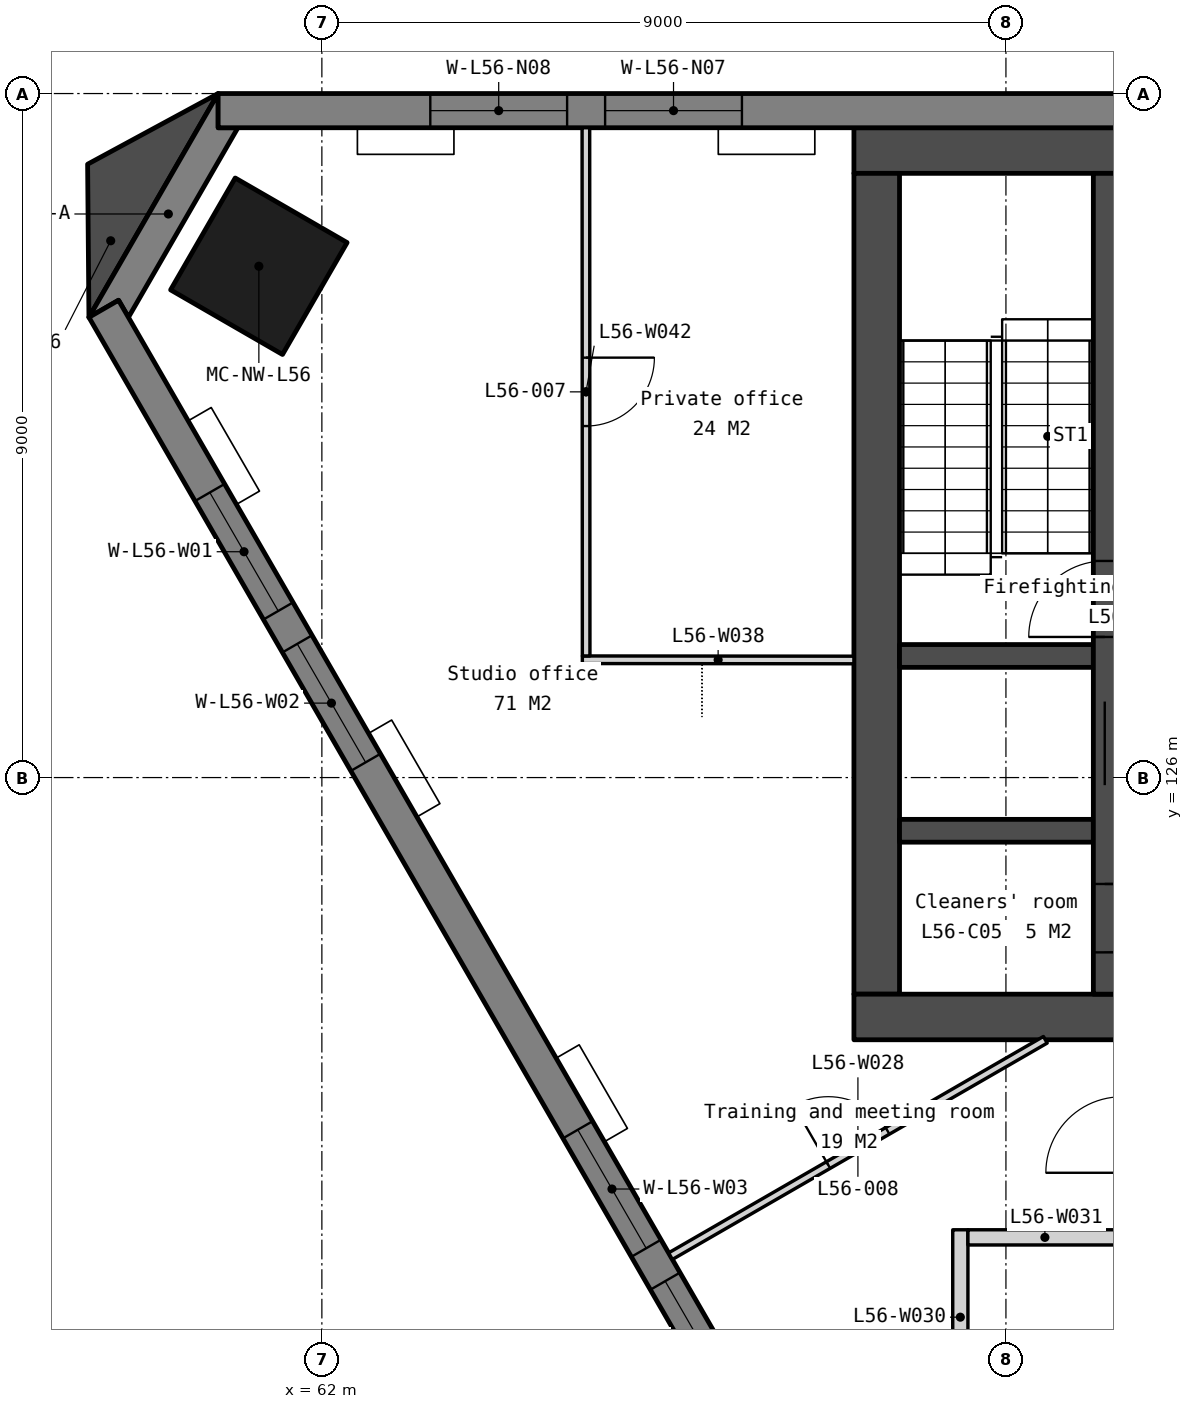
"""IFC4 building model, lengths in metres.
Left out: names, types, materials, properties, quantities, classifications, styles, units other than length and angle.
Written with IfcOpenShell. Run it as: python <this file> out.ifc"""

import sys

from ifc_helpers import new_model, si_unit, direction, frame, frame_2d, origin, origin_2d, place, context, subcontext, project, spatial, polyline, rectangle, outline, extrude, element, fill, save


model = new_model("IFC4")
c1 = context("Model", 3, precision=1e-05, world=origin(), true_north=direction((0.0, 1.0)))
c2 = subcontext(c1, "Body", "Model", "MODEL_VIEW")
j1 = project(units=[si_unit("LENGTHUNIT", "METRE"), si_unit("PLANEANGLEUNIT", "RADIAN")], contexts=[c1])
p1 = place(None, origin())
s1 = spatial("IfcSite", under=j1, at=p1, CompositionType="ELEMENT")
p2 = place(p1, origin())
s2 = spatial("IfcBuilding", under=s1, at=p2, CompositionType="ELEMENT")
p3 = place(p2, frame((0.0, 0.0, 223.1)))
s3 = spatial("IfcBuildingStorey", under=s2, at=p3, CompositionType="ELEMENT", Elevation=223.1)
p4 = place(p3, frame((61.171, 132.728, 0.0), z_axis=(0.0, 0.0, 1.0), x_axis=(-0.5, -0.866025403784, 0.0)))
e1 = element("IfcColumn", 1, at=p4, inside=s3, PredefinedType="COLUMN", context=c2, shape_type="SweptSolid", body=[
    extrude(rectangle(XDim=1.7, YDim=1.7, at=origin_2d()), origin(), (0.0, 0.0, 1.0), 3.9),
])
p5 = place(p3, frame((69.0, 134.25, 0.0), z_axis=(0.0, 0.0, 1.0), x_axis=(1.0, 0.0, 0.0)))
e2 = element("IfcWall", 2, at=p5, inside=s3, PredefinedType="SOLIDWALL", context=c2, shape_type="SweptSolid", body=[
    extrude(rectangle(XDim=22.0, YDim=0.6, at=frame_2d((11.0, 0.0))), origin(), (0.0, 0.0, 1.0), 3.6),
])
p6 = place(p3, frame((69.3, 133.95, 0.0), z_axis=(0.0, 0.0, 1.0), x_axis=(0.0, -1.0, 0.0)))
e3 = element("IfcWall", 3, at=p6, inside=s3, PredefinedType="SOLIDWALL", context=c2, shape_type="SweptSolid", body=[
    extrude(rectangle(XDim=10.8, YDim=0.6, at=frame_2d((5.4, 0.0))), origin(), (0.0, 0.0, 1.0), 3.6),
])
p7 = place(p3, frame((69.0, 122.85, 0.0), z_axis=(0.0, 0.0, 1.0), x_axis=(1.0, 0.0, 0.0)))
e4 = element("IfcWall", 4, at=p7, inside=s3, PredefinedType="SOLIDWALL", context=c2, shape_type="SweptSolid", body=[
    extrude(rectangle(XDim=22.0, YDim=0.6, at=frame_2d((11.0, 0.0))), origin(), (0.0, 0.0, 1.0), 3.6),
])
p8 = place(p7, frame((16.375, 0.0, 0.0)))
e5 = element("IfcOpeningElement", 5, at=p8, cuts=e4, PredefinedType="OPENING", context=c2, shape_type="SweptSolid", body=[
    extrude(rectangle(XDim=1.8, YDim=2.1, at=frame_2d((0.9, 1.05))), frame((0.0, 0.31, 0.0), z_axis=(0.0, -1.0, 0.0), x_axis=(1.0, 0.0, 0.0)), (0.0, 0.0, 1.0), 0.62),
])
p9 = place(p7, frame((3.825, 0.0, 0.0)))
e6 = element("IfcOpeningElement", 6, at=p9, cuts=e4, PredefinedType="OPENING", context=c2, shape_type="SweptSolid", body=[
    extrude(rectangle(XDim=1.8, YDim=2.1, at=frame_2d((0.9, 1.05))), frame((0.0, 0.31, 0.0), z_axis=(0.0, -1.0, 0.0), x_axis=(1.0, 0.0, 0.0)), (0.0, 0.0, 1.0), 0.62),
])
p10 = place(p7, frame((12.85, 0.0, 0.0)))
e7 = element("IfcOpeningElement", 7, at=p10, cuts=e4, PredefinedType="OPENING", context=c2, shape_type="SweptSolid", body=[
    extrude(rectangle(XDim=1.5, YDim=2.1, at=frame_2d((0.75, 1.05))), frame((0.0, 0.31, 0.0), z_axis=(0.0, -1.0, 0.0), x_axis=(1.0, 0.0, 0.0)), (0.0, 0.0, 1.0), 0.62),
])
for number, where, z_axis, x_axis in (
    (8, (69.6, 127.6, 0.0), (0.0, 0.0, 1.0), (1.0, 0.0, 0.0)),
    (9, (69.6, 125.3, 0.0), (0.0, 0.0, 1.0), (1.0, 0.0, 0.0)),
):
    element("IfcWall", number, at=place(p3, frame(where, z_axis=z_axis, x_axis=x_axis)), inside=s3, PredefinedType="SOLIDWALL", context=c2, shape_type="SweptSolid", body=[
        extrude(rectangle(XDim=2.55, YDim=0.3, at=frame_2d((1.275, 0.0))), origin(), (0.0, 0.0, 1.0), 3.6),
    ])
p11 = place(p3, frame((72.3, 133.95, 0.0), z_axis=(0.0, 0.0, 1.0), x_axis=(0.0, -1.0, 0.0)))
e10 = element("IfcWall", 10, at=p11, inside=s3, PredefinedType="SOLIDWALL", context=c2, shape_type="SweptSolid", body=[
    extrude(rectangle(XDim=10.8, YDim=0.3, at=frame_2d((5.4, 0.0))), origin(), (0.0, 0.0, 1.0), 3.6),
])
p12 = place(p11, frame((6.95, 0.0, 0.0)))
e11 = element("IfcOpeningElement", 11, at=p12, cuts=e10, PredefinedType="OPENING", context=c2, shape_type="SweptSolid", body=[
    extrude(rectangle(XDim=1.1, YDim=2.1, at=frame_2d((0.55, 1.05))), frame((0.0, 0.16, 0.0), z_axis=(0.0, -1.0, 0.0), x_axis=(1.0, 0.0, 0.0)), (0.0, 0.0, 1.0), 0.32),
])
p13 = place(p11, frame((9.35, 0.0, 0.0)))
e12 = element("IfcOpeningElement", 12, at=p13, cuts=e10, PredefinedType="OPENING", context=c2, shape_type="SweptSolid", body=[
    extrude(rectangle(XDim=0.9, YDim=2.1, at=frame_2d((0.45, 1.05))), frame((0.0, 0.16, 0.0), z_axis=(0.0, -1.0, 0.0), x_axis=(1.0, 0.0, 0.0)), (0.0, 0.0, 1.0), 0.32),
])
p14 = place(p11, frame((5.1, 0.0, 0.0)))
e13 = element("IfcOpeningElement", 13, at=p14, cuts=e10, PredefinedType="OPENING", context=c2, shape_type="SweptSolid", body=[
    extrude(rectangle(XDim=1.0, YDim=2.1, at=frame_2d((0.5, 1.05))), frame((0.0, 0.16, 0.0), z_axis=(0.0, -1.0, 0.0), x_axis=(1.0, 0.0, 0.0)), (0.0, 0.0, 1.0), 0.32),
])
p15 = place(p3, frame((0.0, 0.0, -0.15)))
e14 = element("IfcWall", 14, at=p15, inside=s3, PredefinedType="SOLIDWALL", context=c2, shape_type="SweptSolid", body=[
    extrude(outline(polyline([(60.635, 135.0), (60.635, 134.55), (60.895, 134.55), (59.455, 132.055), (59.325, 132.281), (58.935, 132.055), (60.635, 135.0)])), origin(), (0.0, 0.0, 1.0), 3.75),
])
p16 = place(p3, frame((99.365, 134.775, -0.15), z_axis=(0.0, 0.0, 1.0), x_axis=(-1.0, 0.0, 0.0)))
e15 = element("IfcWall", 15, at=p16, inside=s3, PredefinedType="SOLIDWALL", context=c2, shape_type="SweptSolid", body=[
    extrude(outline(polyline([(38.729, 0.0), (38.729, 3.75), (0.0, 3.75), (0.0, 0.0), (38.729, 0.0)])), frame((0.0, 0.225, 0.0), z_axis=(0.0, -1.0, 0.0), x_axis=(1.0, 0.0, 0.0)), (0.0, 0.0, 1.0), 0.45),
])
p17 = place(p16, frame((2.791, 0.0, 0.95)))
e16 = element("IfcOpeningElement", 16, at=p17, cuts=e15, PredefinedType="OPENING", context=c2, shape_type="SweptSolid", body=[
    extrude(rectangle(XDim=1.8, YDim=2.2, at=frame_2d((0.9, 1.1))), frame((0.0, 0.235, 0.0), z_axis=(0.0, -1.0, 0.0), x_axis=(1.0, 0.0, 0.0)), (0.0, 0.0, 1.0), 0.47),
])
p18 = place(p16, frame((5.091, 0.0, 0.95)))
e17 = element("IfcOpeningElement", 17, at=p18, cuts=e15, PredefinedType="OPENING", context=c2, shape_type="SweptSolid", body=[
    extrude(rectangle(XDim=1.8, YDim=2.2, at=frame_2d((0.9, 1.1))), frame((0.0, 0.235, 0.0), z_axis=(0.0, -1.0, 0.0), x_axis=(1.0, 0.0, 0.0)), (0.0, 0.0, 1.0), 0.47),
])
p19 = place(p16, frame((12.473, 0.0, 0.95)))
e18 = element("IfcOpeningElement", 18, at=p19, cuts=e15, PredefinedType="OPENING", context=c2, shape_type="SweptSolid", body=[
    extrude(rectangle(XDim=1.8, YDim=2.2, at=frame_2d((0.9, 1.1))), frame((0.0, 0.235, 0.0), z_axis=(0.0, -1.0, 0.0), x_axis=(1.0, 0.0, 0.0)), (0.0, 0.0, 1.0), 0.47),
])
p20 = place(p16, frame((14.773, 0.0, 0.95)))
e19 = element("IfcOpeningElement", 19, at=p20, cuts=e15, PredefinedType="OPENING", context=c2, shape_type="SweptSolid", body=[
    extrude(rectangle(XDim=1.8, YDim=2.2, at=frame_2d((0.9, 1.1))), frame((0.0, 0.235, 0.0), z_axis=(0.0, -1.0, 0.0), x_axis=(1.0, 0.0, 0.0)), (0.0, 0.0, 1.0), 0.47),
])
p21 = place(p16, frame((22.156, 0.0, 0.95)))
e20 = element("IfcOpeningElement", 20, at=p21, cuts=e15, PredefinedType="OPENING", context=c2, shape_type="SweptSolid", body=[
    extrude(rectangle(XDim=1.8, YDim=2.2, at=frame_2d((0.9, 1.1))), frame((0.0, 0.235, 0.0), z_axis=(0.0, -1.0, 0.0), x_axis=(1.0, 0.0, 0.0)), (0.0, 0.0, 1.0), 0.47),
])
p22 = place(p16, frame((24.456, 0.0, 0.95)))
e21 = element("IfcOpeningElement", 21, at=p22, cuts=e15, PredefinedType="OPENING", context=c2, shape_type="SweptSolid", body=[
    extrude(rectangle(XDim=1.8, YDim=2.2, at=frame_2d((0.9, 1.1))), frame((0.0, 0.235, 0.0), z_axis=(0.0, -1.0, 0.0), x_axis=(1.0, 0.0, 0.0)), (0.0, 0.0, 1.0), 0.47),
])
p23 = place(p16, frame((31.838, 0.0, 0.95)))
e22 = element("IfcOpeningElement", 22, at=p23, cuts=e15, PredefinedType="OPENING", context=c2, shape_type="SweptSolid", body=[
    extrude(rectangle(XDim=1.8, YDim=2.2, at=frame_2d((0.9, 1.1))), frame((0.0, 0.235, 0.0), z_axis=(0.0, -1.0, 0.0), x_axis=(1.0, 0.0, 0.0)), (0.0, 0.0, 1.0), 0.47),
])
p24 = place(p16, frame((34.138, 0.0, 0.95)))
e23 = element("IfcOpeningElement", 23, at=p24, cuts=e15, PredefinedType="OPENING", context=c2, shape_type="SweptSolid", body=[
    extrude(rectangle(XDim=1.8, YDim=2.2, at=frame_2d((0.9, 1.1))), frame((0.0, 0.235, 0.0), z_axis=(0.0, -1.0, 0.0), x_axis=(1.0, 0.0, 0.0)), (0.0, 0.0, 1.0), 0.47),
])
p25 = place(p3, frame((59.13, 132.168, -0.15), z_axis=(0.0, 0.0, 1.0), x_axis=(0.500002199942, -0.866024133644, 0.0)))
e24 = element("IfcWall", 24, at=p25, inside=s3, PredefinedType="SOLIDWALL", context=c2, shape_type="SweptSolid", body=[
    extrude(outline(polyline([(38.729, 0.0), (38.729, 3.75), (0.0, 3.75), (0.0, 0.0), (38.729, 0.0)])), frame((0.0, 0.225, 0.0), z_axis=(0.0, -1.0, 0.0), x_axis=(1.0, 0.0, 0.0)), (0.0, 0.0, 1.0), 0.45),
])
p26 = place(p25, frame((2.791, 0.0, 0.95)))
e25 = element("IfcOpeningElement", 25, at=p26, cuts=e24, PredefinedType="OPENING", context=c2, shape_type="SweptSolid", body=[
    extrude(rectangle(XDim=1.8, YDim=2.2, at=frame_2d((0.9, 1.1))), frame((0.0, 0.235, 0.0), z_axis=(0.0, -1.0, 0.0), x_axis=(1.0, 0.0, 0.0)), (0.0, 0.0, 1.0), 0.47),
])
p27 = place(p25, frame((5.091, 0.0, 0.95)))
e26 = element("IfcOpeningElement", 26, at=p27, cuts=e24, PredefinedType="OPENING", context=c2, shape_type="SweptSolid", body=[
    extrude(rectangle(XDim=1.8, YDim=2.2, at=frame_2d((0.9, 1.1))), frame((0.0, 0.235, 0.0), z_axis=(0.0, -1.0, 0.0), x_axis=(1.0, 0.0, 0.0)), (0.0, 0.0, 1.0), 0.47),
])
p28 = place(p25, frame((12.473, 0.0, 0.95)))
e27 = element("IfcOpeningElement", 27, at=p28, cuts=e24, PredefinedType="OPENING", context=c2, shape_type="SweptSolid", body=[
    extrude(rectangle(XDim=1.8, YDim=2.2, at=frame_2d((0.9, 1.1))), frame((0.0, 0.235, 0.0), z_axis=(0.0, -1.0, 0.0), x_axis=(1.0, 0.0, 0.0)), (0.0, 0.0, 1.0), 0.47),
])
p29 = place(p25, frame((14.773, 0.0, 0.95)))
e28 = element("IfcOpeningElement", 28, at=p29, cuts=e24, PredefinedType="OPENING", context=c2, shape_type="SweptSolid", body=[
    extrude(rectangle(XDim=1.8, YDim=2.2, at=frame_2d((0.9, 1.1))), frame((0.0, 0.235, 0.0), z_axis=(0.0, -1.0, 0.0), x_axis=(1.0, 0.0, 0.0)), (0.0, 0.0, 1.0), 0.47),
])
p30 = place(p25, frame((22.156, 0.0, 0.95)))
e29 = element("IfcOpeningElement", 29, at=p30, cuts=e24, PredefinedType="OPENING", context=c2, shape_type="SweptSolid", body=[
    extrude(rectangle(XDim=1.8, YDim=2.2, at=frame_2d((0.9, 1.1))), frame((0.0, 0.235, 0.0), z_axis=(0.0, -1.0, 0.0), x_axis=(1.0, 0.0, 0.0)), (0.0, 0.0, 1.0), 0.47),
])
p31 = place(p25, frame((24.456, 0.0, 0.95)))
e30 = element("IfcOpeningElement", 30, at=p31, cuts=e24, PredefinedType="OPENING", context=c2, shape_type="SweptSolid", body=[
    extrude(rectangle(XDim=1.8, YDim=2.2, at=frame_2d((0.9, 1.1))), frame((0.0, 0.235, 0.0), z_axis=(0.0, -1.0, 0.0), x_axis=(1.0, 0.0, 0.0)), (0.0, 0.0, 1.0), 0.47),
])
p32 = place(p25, frame((31.838, 0.0, 0.95)))
e31 = element("IfcOpeningElement", 31, at=p32, cuts=e24, PredefinedType="OPENING", context=c2, shape_type="SweptSolid", body=[
    extrude(rectangle(XDim=1.8, YDim=2.2, at=frame_2d((0.9, 1.1))), frame((0.0, 0.235, 0.0), z_axis=(0.0, -1.0, 0.0), x_axis=(1.0, 0.0, 0.0)), (0.0, 0.0, 1.0), 0.47),
])
p33 = place(p25, frame((34.138, 0.0, 0.95)))
e32 = element("IfcOpeningElement", 32, at=p33, cuts=e24, PredefinedType="OPENING", context=c2, shape_type="SweptSolid", body=[
    extrude(rectangle(XDim=1.8, YDim=2.2, at=frame_2d((0.9, 1.1))), frame((0.0, 0.235, 0.0), z_axis=(0.0, -1.0, 0.0), x_axis=(1.0, 0.0, 0.0)), (0.0, 0.0, 1.0), 0.47),
])
p34 = place(p3, frame((0.0, 0.0, -0.15)))
e33 = element("IfcWall", 33, at=p34, inside=s3, PredefinedType="SOLIDWALL", context=c2, shape_type="SweptSolid", body=[
    extrude(outline(polyline([(60.635, 135.0), (58.918, 134.07), (58.935, 132.055), (60.635, 135.0)])), origin(), (0.0, 0.0, 1.0), 3.75),
])
p35 = place(p3, frame((66.587, 119.703, 0.0), z_axis=(0.0, 0.0, 1.0), x_axis=(0.866023511746, 0.500003277092, 0.0)))
e34 = element("IfcWall", 34, at=p35, inside=s3, PredefinedType="PARTITIONING", context=c2, shape_type="SweptSolid", body=[
    extrude(rectangle(XDim=5.694, YDim=0.1, at=frame_2d((2.847, 0.0))), origin(), (0.0, 0.0, 1.0), 3.6),
])
p36 = place(p35, frame((2.397, 0.0, 0.0)))
e35 = element("IfcOpeningElement", 35, at=p36, cuts=e34, PredefinedType="OPENING", context=c2, shape_type="SweptSolid", body=[
    extrude(rectangle(XDim=0.9, YDim=2.1, at=frame_2d((0.45, 1.05))), frame((0.0, 0.06, 0.0), z_axis=(0.0, -1.0, 0.0), x_axis=(1.0, 0.0, 0.0)), (0.0, 0.0, 1.0), 0.12),
])
p37 = place(p3, frame((70.4, 117.75, 0.0), z_axis=(0.0, 0.0, 1.0), x_axis=(0.0, 1.0, 0.0)))
e36 = element("IfcWall", 36, at=p37, inside=s3, PredefinedType="PARTITIONING", context=c2, shape_type="SweptSolid", body=[
    extrude(rectangle(XDim=2.3, YDim=0.2, at=frame_2d((1.15, 0.0))), origin(), (0.0, 0.0, 1.0), 3.6),
])
p38 = place(p3, frame((70.5, 119.95, 0.0), z_axis=(0.0, 0.0, 1.0), x_axis=(1.0, 0.0, 0.0)))
e37 = element("IfcWall", 37, at=p38, inside=s3, PredefinedType="PARTITIONING", context=c2, shape_type="SweptSolid", body=[
    extrude(rectangle(XDim=2.025, YDim=0.2, at=frame_2d((1.012, 0.0))), origin(), (0.0, 0.0, 1.0), 3.6),
])
p39 = place(p3, frame((65.427, 127.55, 0.0), z_axis=(0.0, 0.0, 1.0), x_axis=(0.999999663839, -0.000819951894, 0.0)))
e38 = element("IfcWall", 38, at=p39, inside=s3, PredefinedType="PARTITIONING", context=c2, shape_type="SweptSolid", body=[
    extrude(rectangle(XDim=3.573, YDim=0.1, at=frame_2d((1.787, 0.0))), origin(), (0.0, 0.0, 1.0), 3.6),
])
p40 = place(p3, frame((65.474, 134.55, 0.0), z_axis=(0.0, 0.0, 1.0), x_axis=(0.000491814737, -0.999999879059, 0.0)))
e39 = element("IfcWall", 39, at=p40, inside=s3, PredefinedType="PARTITIONING", context=c2, shape_type="SweptSolid", body=[
    extrude(rectangle(XDim=6.95, YDim=0.1, at=frame_2d((3.475, 0.0))), origin(), (0.0, 0.0, 1.0), 3.6),
])
p41 = place(p40, frame((3.025, 0.0, 0.0)))
e40 = element("IfcOpeningElement", 40, at=p41, cuts=e39, PredefinedType="OPENING", context=c2, shape_type="SweptSolid", body=[
    extrude(rectangle(XDim=0.9, YDim=2.1, at=frame_2d((0.45, 1.05))), frame((0.0, 0.06, 0.0), z_axis=(0.0, -1.0, 0.0), x_axis=(1.0, 0.0, 0.0)), (0.0, 0.0, 1.0), 0.12),
])
p42 = place(p12, origin())
e41 = element("IfcDoor", 41, at=p42, inside=s3, OperationType="SLIDING_TO_LEFT", PredefinedType="DOOR", context=c2, shape_type="SweptSolid", body=[
    extrude(rectangle(XDim=1.1, YDim=2.1, at=frame_2d((0.55, 1.05))), frame((0.0, 0.025, 0.0), z_axis=(0.0, -1.0, 0.0), x_axis=(1.0, 0.0, 0.0)), (0.0, 0.0, 1.0), 0.05),
])
fill(e11, e41)
p43 = place(p13, origin())
e42 = element("IfcDoor", 42, at=p43, inside=s3, OperationType="SINGLE_SWING_LEFT", PredefinedType="DOOR", context=c2, shape_type="SweptSolid", body=[
    extrude(rectangle(XDim=0.9, YDim=2.1, at=frame_2d((0.45, 1.05))), frame((0.0, 0.025, 0.0), z_axis=(0.0, -1.0, 0.0), x_axis=(1.0, 0.0, 0.0)), (0.0, 0.0, 1.0), 0.05),
])
fill(e12, e42)
p44 = place(p14, origin())
e43 = element("IfcDoor", 43, at=p44, inside=s3, OperationType="SINGLE_SWING_RIGHT", PredefinedType="DOOR", context=c2, shape_type="SweptSolid", body=[
    extrude(rectangle(XDim=1.0, YDim=2.1, at=frame_2d((0.5, 1.05))), frame((0.0, 0.025, 0.0), z_axis=(0.0, -1.0, 0.0), x_axis=(1.0, 0.0, 0.0)), (0.0, 0.0, 1.0), 0.05),
])
fill(e13, e43)
p45 = place(p23, origin())
e44 = element("IfcWindow", 44, at=p45, inside=s3, PartitioningType="SINGLE_PANEL", PredefinedType="WINDOW", context=c2, shape_type="SweptSolid", body=[
    extrude(rectangle(XDim=1.8, YDim=2.2, at=frame_2d((0.9, 1.1))), frame((0.0, 0.03, 0.0), z_axis=(0.0, -1.0, 0.0), x_axis=(1.0, 0.0, 0.0)), (0.0, 0.0, 1.0), 0.06),
])
fill(e22, e44)
p46 = place(p24, origin())
e45 = element("IfcWindow", 45, at=p46, inside=s3, PartitioningType="SINGLE_PANEL", PredefinedType="WINDOW", context=c2, shape_type="SweptSolid", body=[
    extrude(rectangle(XDim=1.8, YDim=2.2, at=frame_2d((0.9, 1.1))), frame((0.0, 0.03, 0.0), z_axis=(0.0, -1.0, 0.0), x_axis=(1.0, 0.0, 0.0)), (0.0, 0.0, 1.0), 0.06),
])
fill(e23, e45)
p47 = place(p26, origin())
e46 = element("IfcWindow", 46, at=p47, inside=s3, PartitioningType="SINGLE_PANEL", PredefinedType="WINDOW", context=c2, shape_type="SweptSolid", body=[
    extrude(rectangle(XDim=1.8, YDim=2.2, at=frame_2d((0.9, 1.1))), frame((0.0, 0.03, 0.0), z_axis=(0.0, -1.0, 0.0), x_axis=(1.0, 0.0, 0.0)), (0.0, 0.0, 1.0), 0.06),
])
fill(e25, e46)
p48 = place(p27, origin())
e47 = element("IfcWindow", 47, at=p48, inside=s3, PartitioningType="SINGLE_PANEL", PredefinedType="WINDOW", context=c2, shape_type="SweptSolid", body=[
    extrude(rectangle(XDim=1.8, YDim=2.2, at=frame_2d((0.9, 1.1))), frame((0.0, 0.03, 0.0), z_axis=(0.0, -1.0, 0.0), x_axis=(1.0, 0.0, 0.0)), (0.0, 0.0, 1.0), 0.06),
])
fill(e26, e47)
p49 = place(p28, origin())
e48 = element("IfcWindow", 48, at=p49, inside=s3, PartitioningType="SINGLE_PANEL", PredefinedType="WINDOW", context=c2, shape_type="SweptSolid", body=[
    extrude(rectangle(XDim=1.8, YDim=2.2, at=frame_2d((0.9, 1.1))), frame((0.0, 0.03, 0.0), z_axis=(0.0, -1.0, 0.0), x_axis=(1.0, 0.0, 0.0)), (0.0, 0.0, 1.0), 0.06),
])
fill(e27, e48)
p50 = place(p29, origin())
e49 = element("IfcWindow", 49, at=p50, inside=s3, PartitioningType="SINGLE_PANEL", PredefinedType="WINDOW", context=c2, shape_type="SweptSolid", body=[
    extrude(rectangle(XDim=1.8, YDim=2.2, at=frame_2d((0.9, 1.1))), frame((0.0, 0.03, 0.0), z_axis=(0.0, -1.0, 0.0), x_axis=(1.0, 0.0, 0.0)), (0.0, 0.0, 1.0), 0.06),
])
fill(e28, e49)
p51 = place(p41, origin())
e50 = element("IfcDoor", 50, at=p51, inside=s3, OperationType="SINGLE_SWING_LEFT", PredefinedType="DOOR", context=c2, shape_type="SweptSolid", body=[
    extrude(rectangle(XDim=0.9, YDim=2.1, at=frame_2d((0.45, 1.05))), frame((0.0, 0.025, 0.0), z_axis=(0.0, -1.0, 0.0), x_axis=(1.0, 0.0, 0.0)), (0.0, 0.0, 1.0), 0.05),
])
fill(e40, e50)
p52 = place(p36, origin())
e51 = element("IfcDoor", 51, at=p52, inside=s3, OperationType="SINGLE_SWING_LEFT", PredefinedType="DOOR", context=c2, shape_type="SweptSolid", body=[
    extrude(rectangle(XDim=0.9, YDim=2.1, at=frame_2d((0.45, 1.05))), frame((0.0, 0.025, 0.0), z_axis=(0.0, -1.0, 0.0), x_axis=(1.0, 0.0, 0.0)), (0.0, 0.0, 1.0), 0.05),
])
fill(e35, e51)
save(model, sys.argv[1])
